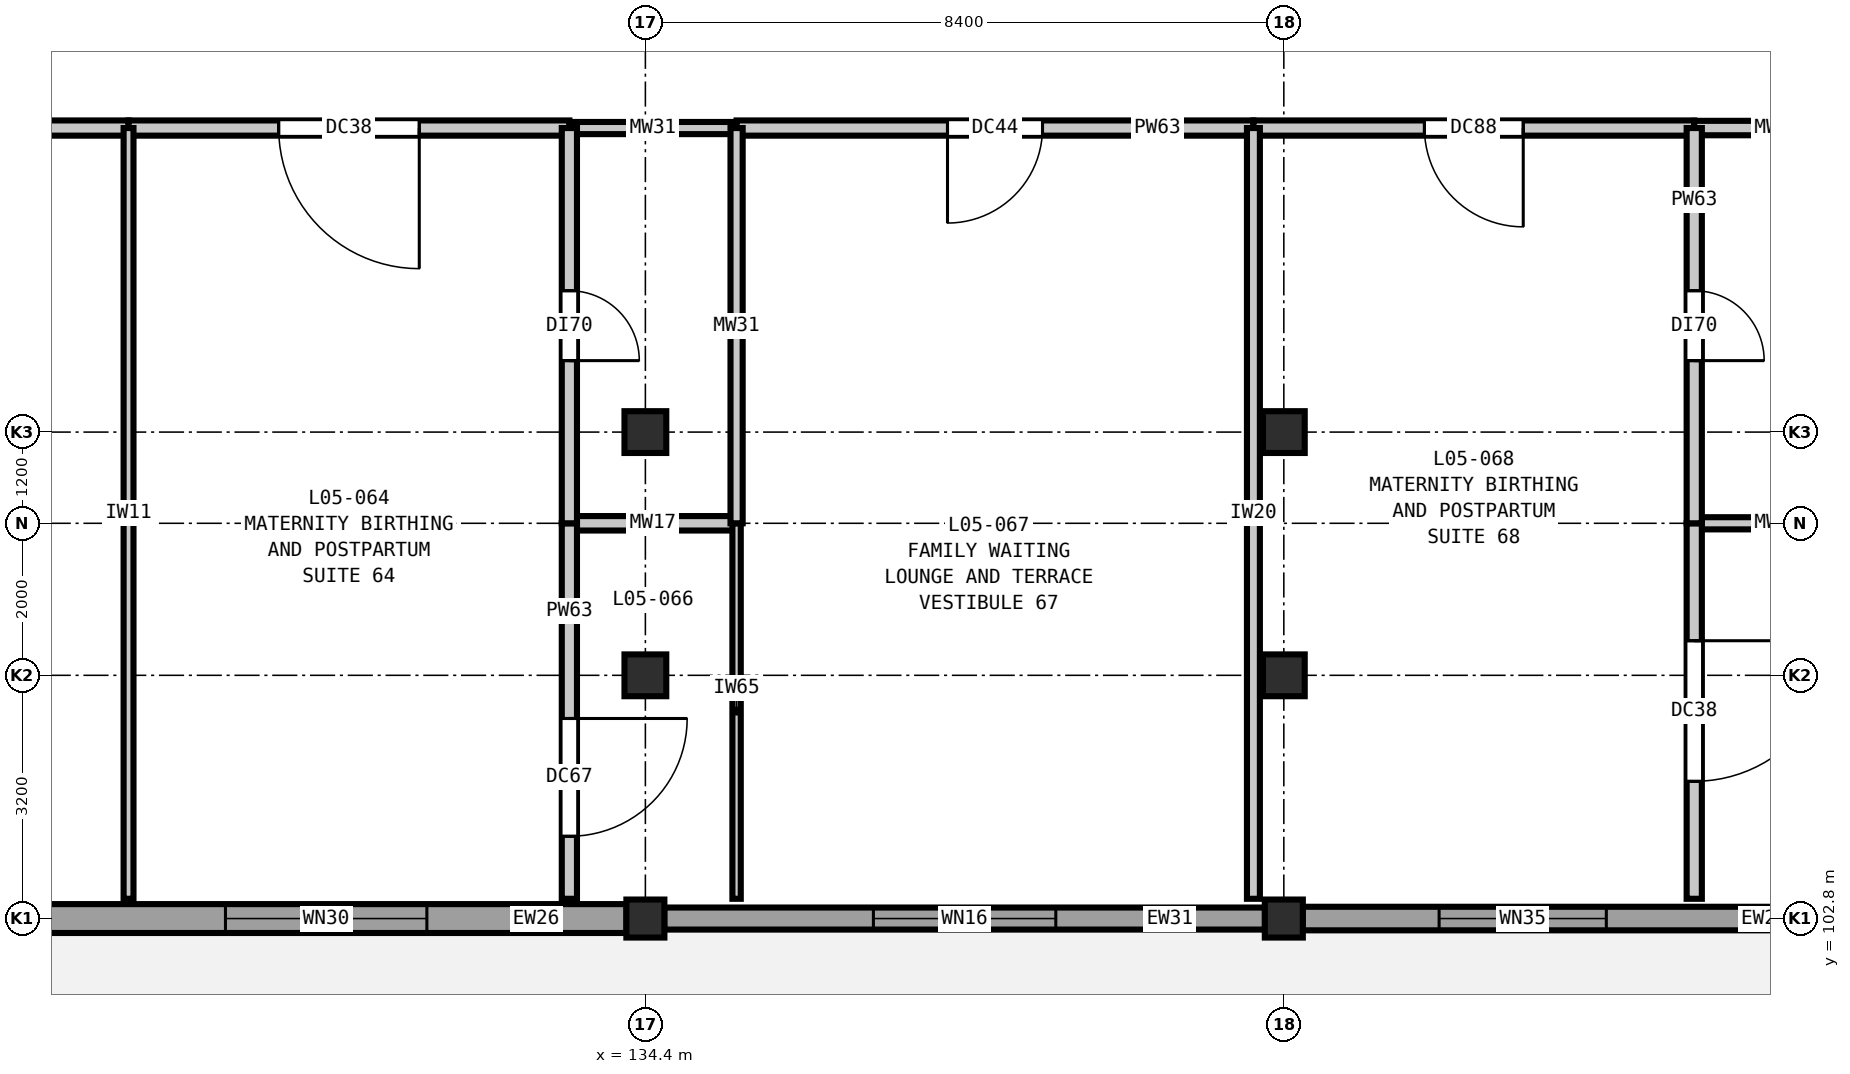
"""IFC4 building model, lengths in metres.
Left out: names, types, materials, properties, quantities, classifications, styles, units other than length and angle.
Written with IfcOpenShell. Run it as: python <this file> out.ifc"""

import sys

from ifc_helpers import new_model, si_unit, direction, frame, frame_2d, origin, origin_2d, place, context, subcontext, project, spatial, rectangle, extrude, element, fill, save


model = new_model("IFC4")
c1 = context("Model", 3, precision=1e-05, world=origin(), true_north=direction((0.0, 1.0)))
c2 = subcontext(c1, "Body", "Model", "MODEL_VIEW")
j1 = project(units=[si_unit("LENGTHUNIT", "METRE"), si_unit("PLANEANGLEUNIT", "RADIAN")], contexts=[c1])
p1 = place(None, origin())
s1 = spatial("IfcSite", under=j1, at=p1, CompositionType="ELEMENT")
p2 = place(p1, origin())
s2 = spatial("IfcBuilding", under=s1, at=p2, CompositionType="ELEMENT")
p3 = place(p2, frame((0.0, 0.0, 24.6)))
s3 = spatial("IfcBuildingStorey", under=s2, at=p3, CompositionType="ELEMENT", Elevation=24.6)
p4 = place(p3, frame((134.4, 102.8, 0.0), z_axis=(0.0, 0.0, 1.0), x_axis=(1.0, 0.0, 0.0)))
e1 = element("IfcColumn", 1, at=p4, inside=s3, PredefinedType="COLUMN", context=c2, shape_type="SweptSolid", body=[
    extrude(rectangle(XDim=0.5, YDim=0.5, at=origin_2d()), origin(), (0.0, 0.0, 1.0), 4.2),
])
for number, where, z_axis, x_axis in (
    (2, (134.4, 106.0, 0.0), (0.0, 0.0, 1.0), (1.0, 0.0, 0.0)),
    (3, (134.4, 109.2, 0.0), (0.0, 0.0, 1.0), (1.0, 0.0, 0.0)),
):
    element("IfcColumn", number, at=place(p3, frame(where, z_axis=z_axis, x_axis=x_axis)), inside=s3, PredefinedType="COLUMN", context=c2, shape_type="SweptSolid", body=[
        extrude(rectangle(XDim=0.55, YDim=0.55, at=origin_2d()), origin(), (0.0, 0.0, 1.0), 4.2),
    ])
p5 = place(p3, frame((142.8, 102.8, 0.0), z_axis=(0.0, 0.0, 1.0), x_axis=(1.0, 0.0, 0.0)))
e4 = element("IfcColumn", 4, at=p5, inside=s3, PredefinedType="COLUMN", context=c2, shape_type="SweptSolid", body=[
    extrude(rectangle(XDim=0.5, YDim=0.5, at=origin_2d()), origin(), (0.0, 0.0, 1.0), 4.2),
])
for number, where, z_axis, x_axis in (
    (5, (142.8, 106.0, 0.0), (0.0, 0.0, 1.0), (1.0, 0.0, 0.0)),
    (6, (142.8, 109.2, 0.0), (0.0, 0.0, 1.0), (1.0, 0.0, 0.0)),
):
    element("IfcColumn", number, at=place(p3, frame(where, z_axis=z_axis, x_axis=x_axis)), inside=s3, PredefinedType="COLUMN", context=c2, shape_type="SweptSolid", body=[
        extrude(rectangle(XDim=0.55, YDim=0.55, at=origin_2d()), origin(), (0.0, 0.0, 1.0), 4.2),
    ])
p6 = place(p3, frame((150.952, 102.8, 0.0), z_axis=(0.0, 0.0, 1.0), x_axis=(-1.0, 0.0, 0.0)))
e7 = element("IfcWall", 7, at=p6, inside=s3, PredefinedType="SOLIDWALL", context=c2, shape_type="SweptSolid", body=[
    extrude(rectangle(XDim=7.904, YDim=0.31, at=frame_2d((3.952, 0.0))), origin(), (0.0, 0.0, 1.0), 3.48),
])
p7 = place(p6, frame((3.909, 0.0, 0.9)))
e8 = element("IfcOpeningElement", 8, at=p7, cuts=e7, PredefinedType="OPENING", context=c2, shape_type="SweptSolid", body=[
    extrude(rectangle(XDim=2.2, YDim=1.95, at=frame_2d((1.1, 0.975))), frame((0.0, 0.165, 0.0), z_axis=(0.0, -1.0, 0.0), x_axis=(1.0, 0.0, 0.0)), (0.0, 0.0, 1.0), 0.33),
])
p8 = place(p3, frame((142.552, 102.8, 0.0), z_axis=(0.0, 0.0, 1.0), x_axis=(-1.0, 0.0, 0.0)))
e9 = element("IfcWall", 9, at=p8, inside=s3, PredefinedType="SOLIDWALL", context=c2, shape_type="SweptSolid", body=[
    extrude(rectangle(XDim=7.904, YDim=0.29, at=frame_2d((3.952, 0.0))), origin(), (0.0, 0.0, 1.0), 3.48),
])
p9 = place(p8, frame((2.752, 0.0, 0.9)))
e10 = element("IfcOpeningElement", 10, at=p9, cuts=e9, PredefinedType="OPENING", context=c2, shape_type="SweptSolid", body=[
    extrude(rectangle(XDim=2.4, YDim=1.95, at=frame_2d((1.2, 0.975))), frame((0.0, 0.155, 0.0), z_axis=(0.0, -1.0, 0.0), x_axis=(1.0, 0.0, 0.0)), (0.0, 0.0, 1.0), 0.31),
])
p10 = place(p3, frame((134.152, 102.8, 0.0), z_axis=(0.0, 0.0, 1.0), x_axis=(-1.0, 0.0, 0.0)))
e11 = element("IfcWall", 11, at=p10, inside=s3, PredefinedType="SOLIDWALL", context=c2, shape_type="SweptSolid", body=[
    extrude(rectangle(XDim=7.904, YDim=0.38, at=frame_2d((3.952, 0.0))), origin(), (0.0, 0.0, 1.0), 3.48),
])
p11 = place(p10, frame((2.627, 0.0, 0.9)))
e12 = element("IfcOpeningElement", 12, at=p11, cuts=e11, PredefinedType="OPENING", context=c2, shape_type="SweptSolid", body=[
    extrude(rectangle(XDim=2.65, YDim=1.95, at=frame_2d((1.325, 0.975))), frame((0.0, 0.2, 0.0), z_axis=(0.0, -1.0, 0.0), x_axis=(1.0, 0.0, 0.0)), (0.0, 0.0, 1.0), 0.4),
])
p12 = place(p3, frame((133.4, 108.0, 0.0), z_axis=(0.0, 0.0, 1.0), x_axis=(1.0, 0.0, 0.0)))
e13 = element("IfcWall", 13, at=p12, inside=s3, PredefinedType="PLUMBINGWALL", context=c2, shape_type="SweptSolid", body=[
    extrude(rectangle(XDim=2.2, YDim=0.19, at=frame_2d((1.1, 0.0))), origin(), (0.0, 0.0, 1.0), 3.92),
])
p13 = place(p3, frame((148.2, 108.0, 0.0), z_axis=(0.0, 0.0, 1.0), x_axis=(1.0, 0.0, 0.0)))
e14 = element("IfcWall", 14, at=p13, inside=s3, PredefinedType="PLUMBINGWALL", context=c2, shape_type="SweptSolid", body=[
    extrude(rectangle(XDim=2.2, YDim=0.16, at=frame_2d((1.1, 0.0))), origin(), (0.0, 0.0, 1.0), 3.92),
])
p14 = place(p3, frame((120.8, 113.2, 0.0), z_axis=(0.0, 0.0, 1.0), x_axis=(1.0, 0.0, 0.0)))
e15 = element("IfcWall", 15, at=p14, inside=s3, PredefinedType="PARTITIONING", context=c2, shape_type="SweptSolid", body=[
    extrude(rectangle(XDim=6.8, YDim=0.2, at=frame_2d((3.4, 0.0))), origin(), (0.0, 0.0, 1.0), 3.92),
])
p15 = place(p14, frame((2.55, 0.0, 0.0)))
e16 = element("IfcOpeningElement", 16, at=p15, cuts=e15, PredefinedType="OPENING", context=c2, shape_type="SweptSolid", body=[
    extrude(rectangle(XDim=1.7, YDim=2.3, at=frame_2d((0.85, 1.15))), frame((0.0, 0.11, 0.0), z_axis=(0.0, -1.0, 0.0), x_axis=(1.0, 0.0, 0.0)), (0.0, 0.0, 1.0), 0.22),
])
p16 = place(p3, frame((127.6, 113.2, 0.0), z_axis=(0.0, 0.0, 1.0), x_axis=(1.0, 0.0, 0.0)))
e17 = element("IfcWall", 17, at=p16, inside=s3, PredefinedType="PARTITIONING", context=c2, shape_type="SweptSolid", body=[
    extrude(rectangle(XDim=5.8, YDim=0.2, at=frame_2d((2.9, 0.0))), origin(), (0.0, 0.0, 1.0), 3.92),
])
p17 = place(p16, frame((1.975, 0.0, 0.0)))
e18 = element("IfcOpeningElement", 18, at=p17, cuts=e17, PredefinedType="OPENING", context=c2, shape_type="SweptSolid", body=[
    extrude(rectangle(XDim=1.85, YDim=2.3, at=frame_2d((0.925, 1.15))), frame((0.0, 0.11, 0.0), z_axis=(0.0, -1.0, 0.0), x_axis=(1.0, 0.0, 0.0)), (0.0, 0.0, 1.0), 0.22),
])
p18 = place(p3, frame((133.4, 113.2, 0.0), z_axis=(0.0, 0.0, 1.0), x_axis=(1.0, 0.0, 0.0)))
e19 = element("IfcWall", 19, at=p18, inside=s3, PredefinedType="PLUMBINGWALL", context=c2, shape_type="SweptSolid", body=[
    extrude(rectangle(XDim=2.2, YDim=0.16, at=frame_2d((1.1, 0.0))), origin(), (0.0, 0.0, 1.0), 3.92),
])
p19 = place(p3, frame((135.6, 113.2, 0.0), z_axis=(0.0, 0.0, 1.0), x_axis=(1.0, 0.0, 0.0)))
e20 = element("IfcWall", 20, at=p19, inside=s3, PredefinedType="PARTITIONING", context=c2, shape_type="SweptSolid", body=[
    extrude(rectangle(XDim=6.8, YDim=0.2, at=frame_2d((3.4, 0.0))), origin(), (0.0, 0.0, 1.0), 3.92),
])
p20 = place(p19, frame((2.775, 0.0, 0.0)))
e21 = element("IfcOpeningElement", 21, at=p20, cuts=e20, PredefinedType="OPENING", context=c2, shape_type="SweptSolid", body=[
    extrude(rectangle(XDim=1.25, YDim=2.15, at=frame_2d((0.625, 1.075))), frame((0.0, 0.11, 0.0), z_axis=(0.0, -1.0, 0.0), x_axis=(1.0, 0.0, 0.0)), (0.0, 0.0, 1.0), 0.22),
])
p21 = place(p3, frame((142.4, 113.2, 0.0), z_axis=(0.0, 0.0, 1.0), x_axis=(1.0, 0.0, 0.0)))
e22 = element("IfcWall", 22, at=p21, inside=s3, PredefinedType="PARTITIONING", context=c2, shape_type="SweptSolid", body=[
    extrude(rectangle(XDim=5.8, YDim=0.2, at=frame_2d((2.9, 0.0))), origin(), (0.0, 0.0, 1.0), 3.92),
])
p22 = place(p21, frame((2.25, 0.0, 0.0)))
e23 = element("IfcOpeningElement", 23, at=p22, cuts=e22, PredefinedType="OPENING", context=c2, shape_type="SweptSolid", body=[
    extrude(rectangle(XDim=1.3, YDim=2.2, at=frame_2d((0.65, 1.1))), frame((0.0, 0.11, 0.0), z_axis=(0.0, -1.0, 0.0), x_axis=(1.0, 0.0, 0.0)), (0.0, 0.0, 1.0), 0.22),
])
p23 = place(p3, frame((148.2, 113.2, 0.0), z_axis=(0.0, 0.0, 1.0), x_axis=(1.0, 0.0, 0.0)))
e24 = element("IfcWall", 24, at=p23, inside=s3, PredefinedType="PLUMBINGWALL", context=c2, shape_type="SweptSolid", body=[
    extrude(rectangle(XDim=2.2, YDim=0.19, at=frame_2d((1.1, 0.0))), origin(), (0.0, 0.0, 1.0), 3.92),
])
p24 = place(p3, frame((127.6, 103.06, 0.0), z_axis=(0.0, 0.0, 1.0), x_axis=(0.0, 1.0, 0.0)))
e25 = element("IfcWall", 25, at=p24, inside=s3, PredefinedType="PARTITIONING", context=c2, shape_type="SweptSolid", body=[
    extrude(rectangle(XDim=10.14, YDim=0.13, at=frame_2d((5.07, 0.0))), origin(), (0.0, 0.0, 1.0), 3.92),
])
p25 = place(p3, frame((133.4, 103.06, 0.0), z_axis=(0.0, 0.0, 1.0), x_axis=(0.0, 1.0, 0.0)))
e26 = element("IfcWall", 26, at=p25, inside=s3, PredefinedType="PARTITIONING", context=c2, shape_type="SweptSolid", body=[
    extrude(rectangle(XDim=4.94, YDim=0.2, at=frame_2d((2.47, 0.0))), origin(), (0.0, 0.0, 1.0), 3.92),
])
p26 = place(p25, frame((0.822, 0.0, 0.0)))
e27 = element("IfcOpeningElement", 27, at=p26, cuts=e26, PredefinedType="OPENING", context=c2, shape_type="SweptSolid", body=[
    extrude(rectangle(XDim=1.55, YDim=2.25, at=frame_2d((0.775, 1.125))), frame((0.0, 0.11, 0.0), z_axis=(0.0, -1.0, 0.0), x_axis=(1.0, 0.0, 0.0)), (0.0, 0.0, 1.0), 0.22),
])
p27 = place(p3, frame((133.4, 108.0, 0.0), z_axis=(0.0, 0.0, 1.0), x_axis=(0.0, 1.0, 0.0)))
e28 = element("IfcWall", 28, at=p27, inside=s3, PredefinedType="PARTITIONING", context=c2, shape_type="SweptSolid", body=[
    extrude(rectangle(XDim=5.2, YDim=0.2, at=frame_2d((2.6, 0.0))), origin(), (0.0, 0.0, 1.0), 3.92),
])
p28 = place(p27, frame((2.14, 0.0, 0.0)))
e29 = element("IfcOpeningElement", 29, at=p28, cuts=e28, PredefinedType="OPENING", context=c2, shape_type="SweptSolid", body=[
    extrude(rectangle(XDim=0.92, YDim=2.1, at=frame_2d((0.46, 1.05))), frame((0.0, 0.11, 0.0), z_axis=(0.0, -1.0, 0.0), x_axis=(1.0, 0.0, 0.0)), (0.0, 0.0, 1.0), 0.22),
])
p29 = place(p3, frame((135.6, 103.06, 0.0), z_axis=(0.0, 0.0, 1.0), x_axis=(0.0, 1.0, 0.0)))
e30 = element("IfcWall", 30, at=p29, inside=s3, PredefinedType="PARTITIONING", context=c2, shape_type="SweptSolid", body=[
    extrude(rectangle(XDim=4.94, YDim=0.11, at=frame_2d((2.47, 0.0))), origin(), (0.0, 0.0, 1.0), 3.92),
])
p30 = place(p3, frame((135.6, 108.0, 0.0), z_axis=(0.0, 0.0, 1.0), x_axis=(0.0, 1.0, 0.0)))
e31 = element("IfcWall", 31, at=p30, inside=s3, PredefinedType="PLUMBINGWALL", context=c2, shape_type="SweptSolid", body=[
    extrude(rectangle(XDim=5.2, YDim=0.16, at=frame_2d((2.6, 0.0))), origin(), (0.0, 0.0, 1.0), 3.92),
])
p31 = place(p3, frame((142.4, 103.06, 0.0), z_axis=(0.0, 0.0, 1.0), x_axis=(0.0, 1.0, 0.0)))
e32 = element("IfcWall", 32, at=p31, inside=s3, PredefinedType="PARTITIONING", context=c2, shape_type="SweptSolid", body=[
    extrude(rectangle(XDim=10.14, YDim=0.17, at=frame_2d((5.07, 0.0))), origin(), (0.0, 0.0, 1.0), 3.92),
])
p32 = place(p3, frame((148.2, 103.06, 0.0), z_axis=(0.0, 0.0, 1.0), x_axis=(0.0, 1.0, 0.0)))
e33 = element("IfcWall", 33, at=p32, inside=s3, PredefinedType="PARTITIONING", context=c2, shape_type="SweptSolid", body=[
    extrude(rectangle(XDim=4.94, YDim=0.2, at=frame_2d((2.47, 0.0))), origin(), (0.0, 0.0, 1.0), 3.92),
])
p33 = place(p32, frame((1.545, 0.0, 0.0)))
e34 = element("IfcOpeningElement", 34, at=p33, cuts=e33, PredefinedType="OPENING", context=c2, shape_type="SweptSolid", body=[
    extrude(rectangle(XDim=1.85, YDim=2.3, at=frame_2d((0.925, 1.15))), frame((0.0, 0.11, 0.0), z_axis=(0.0, -1.0, 0.0), x_axis=(1.0, 0.0, 0.0)), (0.0, 0.0, 1.0), 0.22),
])
p34 = place(p3, frame((148.2, 108.0, 0.0), z_axis=(0.0, 0.0, 1.0), x_axis=(0.0, 1.0, 0.0)))
e35 = element("IfcWall", 35, at=p34, inside=s3, PredefinedType="PARTITIONING", context=c2, shape_type="SweptSolid", body=[
    extrude(rectangle(XDim=5.2, YDim=0.2, at=frame_2d((2.6, 0.0))), origin(), (0.0, 0.0, 1.0), 3.92),
])
p35 = place(p34, frame((2.14, 0.0, 0.0)))
e36 = element("IfcOpeningElement", 36, at=p35, cuts=e35, PredefinedType="OPENING", context=c2, shape_type="SweptSolid", body=[
    extrude(rectangle(XDim=0.92, YDim=2.1, at=frame_2d((0.46, 1.05))), frame((0.0, 0.11, 0.0), z_axis=(0.0, -1.0, 0.0), x_axis=(1.0, 0.0, 0.0)), (0.0, 0.0, 1.0), 0.22),
])
p36 = place(p7, origin())
e37 = element("IfcWindow", 37, at=p36, inside=s3, PartitioningType="DOUBLE_PANEL_VERTICAL", PredefinedType="WINDOW", context=c2, shape_type="SweptSolid", body=[
    extrude(rectangle(XDim=2.2, YDim=1.95, at=frame_2d((1.1, 0.975))), frame((0.0, 0.03, 0.0), z_axis=(0.0, -1.0, 0.0), x_axis=(1.0, 0.0, 0.0)), (0.0, 0.0, 1.0), 0.06),
])
fill(e8, e37)
p37 = place(p9, origin())
e38 = element("IfcWindow", 38, at=p37, inside=s3, PartitioningType="DOUBLE_PANEL_VERTICAL", PredefinedType="WINDOW", context=c2, shape_type="SweptSolid", body=[
    extrude(rectangle(XDim=2.4, YDim=1.95, at=frame_2d((1.2, 0.975))), frame((0.0, 0.03, 0.0), z_axis=(0.0, -1.0, 0.0), x_axis=(1.0, 0.0, 0.0)), (0.0, 0.0, 1.0), 0.06),
])
fill(e10, e38)
p38 = place(p11, origin())
e39 = element("IfcWindow", 39, at=p38, inside=s3, PartitioningType="DOUBLE_PANEL_VERTICAL", PredefinedType="WINDOW", context=c2, shape_type="SweptSolid", body=[
    extrude(rectangle(XDim=2.65, YDim=1.95, at=frame_2d((1.325, 0.975))), frame((0.0, 0.03, 0.0), z_axis=(0.0, -1.0, 0.0), x_axis=(1.0, 0.0, 0.0)), (0.0, 0.0, 1.0), 0.06),
])
fill(e12, e39)
p39 = place(p17, frame((1.85, 0.0, 0.0), z_axis=(0.0, 0.0, 1.0), x_axis=(-1.0, 0.0, 0.0)))
e40 = element("IfcDoor", 40, at=p39, inside=s3, OperationType="SINGLE_SWING_LEFT", PredefinedType="DOOR", context=c2, shape_type="SweptSolid", body=[
    extrude(rectangle(XDim=1.85, YDim=2.3, at=frame_2d((0.925, 1.15))), frame((0.0, 0.025, 0.0), z_axis=(0.0, -1.0, 0.0), x_axis=(1.0, 0.0, 0.0)), (0.0, 0.0, 1.0), 0.05),
])
fill(e18, e40)
p40 = place(p20, frame((1.25, 0.0, 0.0), z_axis=(0.0, 0.0, 1.0), x_axis=(-1.0, 0.0, 0.0)))
e41 = element("IfcDoor", 41, at=p40, inside=s3, OperationType="SINGLE_SWING_RIGHT", PredefinedType="DOOR", context=c2, shape_type="SweptSolid", body=[
    extrude(rectangle(XDim=1.25, YDim=2.15, at=frame_2d((0.625, 1.075))), frame((0.0, 0.025, 0.0), z_axis=(0.0, -1.0, 0.0), x_axis=(1.0, 0.0, 0.0)), (0.0, 0.0, 1.0), 0.05),
])
fill(e21, e41)
p41 = place(p22, frame((1.3, 0.0, 0.0), z_axis=(0.0, 0.0, 1.0), x_axis=(-1.0, 0.0, 0.0)))
e42 = element("IfcDoor", 42, at=p41, inside=s3, OperationType="SINGLE_SWING_LEFT", PredefinedType="DOOR", context=c2, shape_type="SweptSolid", body=[
    extrude(rectangle(XDim=1.3, YDim=2.2, at=frame_2d((0.65, 1.1))), frame((0.0, 0.025, 0.0), z_axis=(0.0, -1.0, 0.0), x_axis=(1.0, 0.0, 0.0)), (0.0, 0.0, 1.0), 0.05),
])
fill(e23, e42)
p42 = place(p26, frame((1.55, 0.0, 0.0), z_axis=(0.0, 0.0, 1.0), x_axis=(-1.0, 0.0, 0.0)))
e43 = element("IfcDoor", 43, at=p42, inside=s3, OperationType="SINGLE_SWING_LEFT", PredefinedType="DOOR", context=c2, shape_type="SweptSolid", body=[
    extrude(rectangle(XDim=1.55, YDim=2.25, at=frame_2d((0.775, 1.125))), frame((0.0, 0.025, 0.0), z_axis=(0.0, -1.0, 0.0), x_axis=(1.0, 0.0, 0.0)), (0.0, 0.0, 1.0), 0.05),
])
fill(e27, e43)
p43 = place(p28, frame((0.92, 0.0, 0.0), z_axis=(0.0, 0.0, 1.0), x_axis=(-1.0, 0.0, 0.0)))
e44 = element("IfcDoor", 44, at=p43, inside=s3, OperationType="SINGLE_SWING_RIGHT", PredefinedType="DOOR", context=c2, shape_type="SweptSolid", body=[
    extrude(rectangle(XDim=0.92, YDim=2.1, at=frame_2d((0.46, 1.05))), frame((0.0, 0.025, 0.0), z_axis=(0.0, -1.0, 0.0), x_axis=(1.0, 0.0, 0.0)), (0.0, 0.0, 1.0), 0.05),
])
fill(e29, e44)
p44 = place(p33, frame((1.85, 0.0, 0.0), z_axis=(0.0, 0.0, 1.0), x_axis=(-1.0, 0.0, 0.0)))
e45 = element("IfcDoor", 45, at=p44, inside=s3, OperationType="SINGLE_SWING_LEFT", PredefinedType="DOOR", context=c2, shape_type="SweptSolid", body=[
    extrude(rectangle(XDim=1.85, YDim=2.3, at=frame_2d((0.925, 1.15))), frame((0.0, 0.025, 0.0), z_axis=(0.0, -1.0, 0.0), x_axis=(1.0, 0.0, 0.0)), (0.0, 0.0, 1.0), 0.05),
])
fill(e34, e45)
p45 = place(p35, frame((0.92, 0.0, 0.0), z_axis=(0.0, 0.0, 1.0), x_axis=(-1.0, 0.0, 0.0)))
e46 = element("IfcDoor", 46, at=p45, inside=s3, OperationType="SINGLE_SWING_RIGHT", PredefinedType="DOOR", context=c2, shape_type="SweptSolid", body=[
    extrude(rectangle(XDim=0.92, YDim=2.1, at=frame_2d((0.46, 1.05))), frame((0.0, 0.025, 0.0), z_axis=(0.0, -1.0, 0.0), x_axis=(1.0, 0.0, 0.0)), (0.0, 0.0, 1.0), 0.05),
])
fill(e36, e46)
save(model, sys.argv[1])
